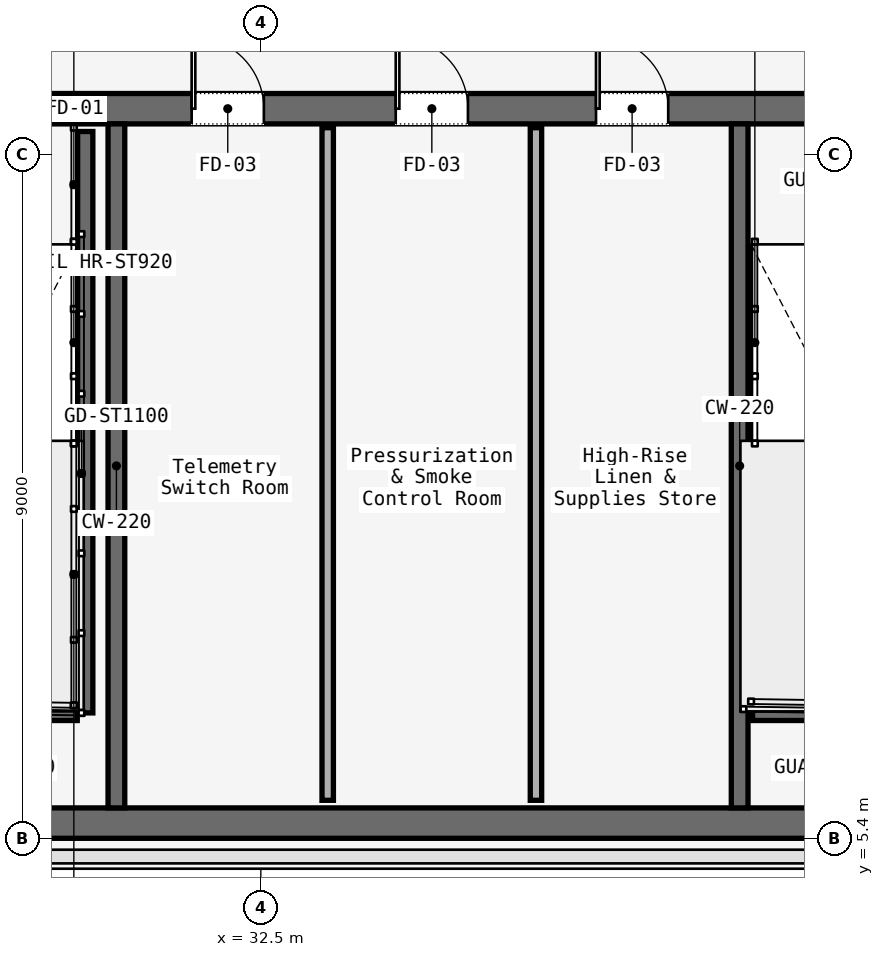
"""IFC4 building model, lengths in metres.
Left out: names, types, materials, properties, quantities, classifications, styles, units other than length and angle.
Written with IfcOpenShell. Run it as: python <this file> out.ifc"""

import sys

from ifc_helpers import new_model, si_unit, direction, frame, frame_2d, origin, place, context, subcontext, project, spatial, rectangle, extrude, element, fill, save


model = new_model("IFC4")
c1 = context("Model", 3, precision=1e-05, world=origin(), true_north=direction((0.0, 1.0)))
c2 = subcontext(c1, "Body", "Model", "MODEL_VIEW")
j1 = project(units=[si_unit("LENGTHUNIT", "METRE"), si_unit("PLANEANGLEUNIT", "RADIAN")], contexts=[c1])
p1 = place(None, origin())
s1 = spatial("IfcSite", under=j1, at=p1, CompositionType="ELEMENT")
p2 = place(p1, origin())
s2 = spatial("IfcBuilding", under=s1, at=p2, CompositionType="ELEMENT")
p3 = place(p2, frame((0.0, 0.0, 263.6)))
s3 = spatial("IfcBuildingStorey", under=s2, at=p3, CompositionType="ELEMENT", Elevation=263.6)
p4 = place(p3, frame((26.45, 15.0, 0.0), z_axis=(0.0, 0.0, 1.0), x_axis=(1.0, 0.0, 0.0)))
e1 = element("IfcWall", 1, at=p4, inside=s3, PredefinedType="SOLIDWALL", context=c2, shape_type="SweptSolid", body=[
    extrude(rectangle(XDim=31.1, YDim=0.4, at=frame_2d((15.55, 0.0))), origin(), (0.0, 0.0, 1.0), 3.58),
])
p5 = place(p4, frame((1.65, 0.0, 0.0)))
e2 = element("IfcOpeningElement", 2, at=p5, cuts=e1, PredefinedType="OPENING", context=c2, shape_type="SweptSolid", body=[
    extrude(rectangle(XDim=1.1, YDim=2.2, at=frame_2d((0.55, 1.1))), frame((0.0, 0.2, 0.0), z_axis=(0.0, -1.0, 0.0), x_axis=(1.0, 0.0, 0.0)), (0.0, 0.0, 1.0), 0.4),
])
p6 = place(p4, frame((13.65, 0.0, 0.0)))
e3 = element("IfcOpeningElement", 3, at=p6, cuts=e1, PredefinedType="OPENING", context=c2, shape_type="SweptSolid", body=[
    extrude(rectangle(XDim=1.1, YDim=2.2, at=frame_2d((0.55, 1.1))), frame((0.0, 0.2, 0.0), z_axis=(0.0, -1.0, 0.0), x_axis=(1.0, 0.0, 0.0)), (0.0, 0.0, 1.0), 0.4),
])
p7 = place(p4, frame((25.55, 0.0, 0.0)))
e4 = element("IfcOpeningElement", 4, at=p7, cuts=e1, PredefinedType="OPENING", context=c2, shape_type="SweptSolid", body=[
    extrude(rectangle(XDim=1.1, YDim=2.2, at=frame_2d((0.55, 1.1))), frame((0.0, 0.2, 0.0), z_axis=(0.0, -1.0, 0.0), x_axis=(1.0, 0.0, 0.0)), (0.0, 0.0, 1.0), 0.4),
])
p8 = place(p4, frame((19.35, 0.0, 0.0)))
e5 = element("IfcOpeningElement", 5, at=p8, cuts=e1, PredefinedType="OPENING", context=c2, shape_type="SweptSolid", body=[
    extrude(rectangle(XDim=1.1, YDim=2.2, at=frame_2d((0.55, 1.1))), frame((0.0, 0.2, 0.0), z_axis=(0.0, -1.0, 0.0), x_axis=(1.0, 0.0, 0.0)), (0.0, 0.0, 1.0), 0.4),
])
p9 = place(p4, frame((21.4, 0.0, 0.0)))
e6 = element("IfcOpeningElement", 6, at=p9, cuts=e1, PredefinedType="OPENING", context=c2, shape_type="SweptSolid", body=[
    extrude(rectangle(XDim=0.9, YDim=2.1, at=frame_2d((0.45, 1.05))), frame((0.0, 0.2, 0.0), z_axis=(0.0, -1.0, 0.0), x_axis=(1.0, 0.0, 0.0)), (0.0, 0.0, 1.0), 0.4),
])
p10 = place(p4, frame((5.14, 0.0, 0.0)))
e7 = element("IfcOpeningElement", 7, at=p10, cuts=e1, PredefinedType="OPENING", context=c2, shape_type="SweptSolid", body=[
    extrude(rectangle(XDim=0.95, YDim=2.2, at=frame_2d((0.475, 1.1))), frame((0.0, 0.2, 0.0), z_axis=(0.0, -1.0, 0.0), x_axis=(1.0, 0.0, 0.0)), (0.0, 0.0, 1.0), 0.4),
])
p11 = place(p4, frame((7.825, 0.0, 0.0)))
e8 = element("IfcOpeningElement", 8, at=p11, cuts=e1, PredefinedType="OPENING", context=c2, shape_type="SweptSolid", body=[
    extrude(rectangle(XDim=0.95, YDim=2.2, at=frame_2d((0.475, 1.1))), frame((0.0, 0.2, 0.0), z_axis=(0.0, -1.0, 0.0), x_axis=(1.0, 0.0, 0.0)), (0.0, 0.0, 1.0), 0.4),
])
p12 = place(p4, frame((10.46, 0.0, 0.0)))
e9 = element("IfcOpeningElement", 9, at=p12, cuts=e1, PredefinedType="OPENING", context=c2, shape_type="SweptSolid", body=[
    extrude(rectangle(XDim=0.95, YDim=2.2, at=frame_2d((0.475, 1.1))), frame((0.0, 0.2, 0.0), z_axis=(0.0, -1.0, 0.0), x_axis=(1.0, 0.0, 0.0)), (0.0, 0.0, 1.0), 0.4),
])
p13 = place(p4, frame((23.35, 0.0, 0.0)))
e10 = element("IfcOpeningElement", 10, at=p13, cuts=e1, PredefinedType="OPENING", context=c2, shape_type="SweptSolid", body=[
    extrude(rectangle(XDim=1.3, YDim=2.3, at=frame_2d((0.65, 1.15))), frame((0.0, 0.2, 0.0), z_axis=(0.0, -1.0, 0.0), x_axis=(1.0, 0.0, 0.0)), (0.0, 0.0, 1.0), 0.4),
])
p14 = place(p3, frame((26.45, 5.6, 0.0), z_axis=(0.0, 0.0, 1.0), x_axis=(1.0, 0.0, 0.0)))
e11 = element("IfcWall", 11, at=p14, inside=s3, PredefinedType="SOLIDWALL", context=c2, shape_type="SweptSolid", body=[
    extrude(rectangle(XDim=31.1, YDim=0.4, at=frame_2d((15.55, 0.0))), origin(), (0.0, 0.0, 1.0), 3.58),
])
for number, where, z_axis, x_axis in (
    (12, (30.6, 5.8, 0.0), (0.0, 0.0, 1.0), (0.0, 1.0, 0.0)),
    (13, (38.8, 5.8, 0.0), (0.0, 0.0, 1.0), (0.0, 1.0, 0.0)),
):
    element("IfcWall", number, at=place(p3, frame(where, z_axis=z_axis, x_axis=x_axis)), inside=s3, PredefinedType="SOLIDWALL", context=c2, shape_type="SweptSolid", body=[
        extrude(rectangle(XDim=9.0, YDim=0.22, at=frame_2d((4.5, 0.0))), origin(), (0.0, 0.0, 1.0), 3.58),
    ])
p15 = place(p3, frame((30.19, 14.7, 0.0), z_axis=(0.0, 0.0, 1.0), x_axis=(0.0, -1.0, 0.0)))
e14 = element("IfcWall", 14, at=p15, inside=s3, PredefinedType="SOLIDWALL", context=c2, shape_type="SweptSolid", body=[
    extrude(rectangle(XDim=7.65, YDim=0.2, at=frame_2d((3.825, 0.0))), origin(), (0.0, 0.0, 1.0), 3.8),
])
for number, where, z_axis, x_axis in (
    (15, (26.97, 7.05, 0.0), (0.0, 0.0, 1.0), (1.0, 0.0, 0.0)),
    (16, (38.97, 7.05, 0.0), (0.0, 0.0, 1.0), (1.0, 0.0, 0.0)),
):
    element("IfcWall", number, at=place(p3, frame(where, z_axis=z_axis, x_axis=x_axis)), inside=s3, PredefinedType="SOLIDWALL", context=c2, shape_type="SweptSolid", body=[
        extrude(rectangle(XDim=3.115, YDim=0.2, at=frame_2d((1.558, 0.0))), origin(), (0.0, 0.0, 1.0), 3.8),
    ])
for number, where, z_axis, x_axis in (
    (17, (33.38, 5.9, 0.0), (0.0, 0.0, 1.0), (0.0, 1.0, 0.0)),
    (18, (36.12, 5.9, 0.0), (0.0, 0.0, 1.0), (0.0, 1.0, 0.0)),
):
    element("IfcWall", number, at=place(p3, frame(where, z_axis=z_axis, x_axis=x_axis)), inside=s3, PredefinedType="PARTITIONING", context=c2, shape_type="SweptSolid", body=[
        extrude(rectangle(XDim=8.85, YDim=0.15, at=frame_2d((4.425, 0.0))), origin(), (0.0, 0.0, 1.0), 3.01),
    ])
p16 = place(p10, origin())
e19 = element("IfcDoor", 19, at=p16, inside=s3, OperationType="SINGLE_SWING_LEFT", PredefinedType="DOOR", context=c2, shape_type="SweptSolid", body=[
    extrude(rectangle(XDim=0.95, YDim=2.2, at=frame_2d((0.475, 1.1))), frame((0.0, 0.025, 0.0), z_axis=(0.0, -1.0, 0.0), x_axis=(1.0, 0.0, 0.0)), (0.0, 0.0, 1.0), 0.05),
])
fill(e7, e19)
p17 = place(p11, origin())
e20 = element("IfcDoor", 20, at=p17, inside=s3, OperationType="SINGLE_SWING_RIGHT", PredefinedType="DOOR", context=c2, shape_type="SweptSolid", body=[
    extrude(rectangle(XDim=0.95, YDim=2.2, at=frame_2d((0.475, 1.1))), frame((0.0, 0.025, 0.0), z_axis=(0.0, -1.0, 0.0), x_axis=(1.0, 0.0, 0.0)), (0.0, 0.0, 1.0), 0.05),
])
fill(e8, e20)
p18 = place(p12, origin())
e21 = element("IfcDoor", 21, at=p18, inside=s3, OperationType="SINGLE_SWING_LEFT", PredefinedType="DOOR", context=c2, shape_type="SweptSolid", body=[
    extrude(rectangle(XDim=0.95, YDim=2.2, at=frame_2d((0.475, 1.1))), frame((0.0, 0.025, 0.0), z_axis=(0.0, -1.0, 0.0), x_axis=(1.0, 0.0, 0.0)), (0.0, 0.0, 1.0), 0.05),
])
fill(e9, e21)
save(model, sys.argv[1])
